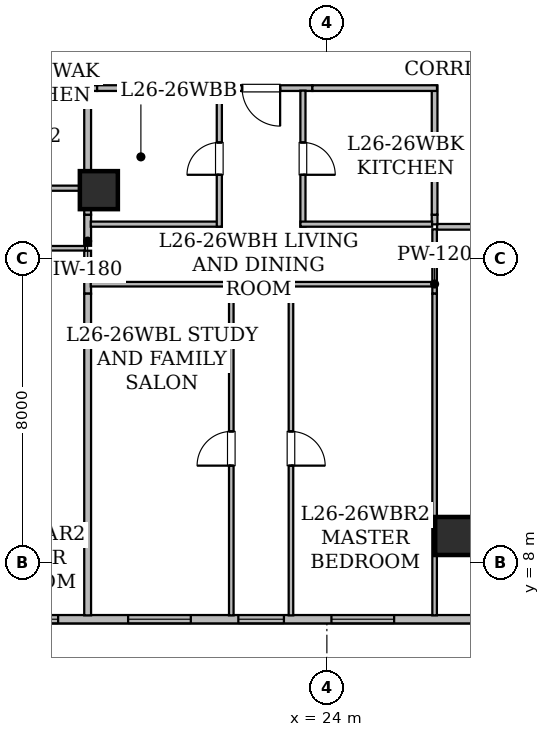
"""IFC4 building model, lengths in metres.
Left out: names, types, materials, properties, quantities, classifications, styles, units other than length and angle.
Written with IfcOpenShell. Run it as: python <this file> out.ifc"""

import sys

from ifc_helpers import new_model, si_unit, direction, frame, frame_2d, origin, origin_2d, place, context, subcontext, project, spatial, rectangle, hollow_rectangle, extrude, element, fill, save


model = new_model("IFC4")
c1 = context("Model", 3, precision=1e-05, world=origin(), true_north=direction((0.0, 1.0)))
c2 = subcontext(c1, "Body", "Model", "MODEL_VIEW")
j1 = project(units=[si_unit("LENGTHUNIT", "METRE"), si_unit("PLANEANGLEUNIT", "RADIAN")], contexts=[c1])
p1 = place(None, origin())
s1 = spatial("IfcSite", under=j1, at=p1, CompositionType="ELEMENT")
p2 = place(p1, origin())
s2 = spatial("IfcBuilding", under=s1, at=p2, CompositionType="ELEMENT")
p3 = place(p2, frame((0.0, 0.0, 105.55)))
s3 = spatial("IfcBuildingStorey", under=s2, at=p3, CompositionType="ELEMENT", Elevation=105.55)
for number, where, z_axis, x_axis in (
    (1, (27.35, 8.7, 0.0), (0.0, 0.0, 1.0), (1.0, 0.0, 0.0)),
    (2, (18.0, 17.8, 0.0), (0.0, 0.0, 1.0), (1.0, 0.0, 0.0)),
):
    element("IfcColumn", number, at=place(p3, frame(where, z_axis=z_axis, x_axis=x_axis)), inside=s3, PredefinedType="COLUMN", context=c2, shape_type="SweptSolid", body=[
        extrude(hollow_rectangle(XDim=1.0, YDim=1.0, WallThickness=0.05, at=origin_2d()), origin(), (0.0, 0.0, 1.0), 3.65),
    ])
p4 = place(p3, frame((52.283, 6.51, 0.0), z_axis=(0.0, 0.0, 1.0), x_axis=(-1.0, 0.0, 0.0)))
e3 = element("IfcWall", 3, at=p4, inside=s3, PredefinedType="STANDARD", context=c2, shape_type="SweptSolid", body=[
    extrude(rectangle(XDim=38.568, YDim=0.22, at=frame_2d((19.284, 0.0))), origin(), (0.0, 0.0, 1.0), 3.43),
])
p5 = place(p4, frame((21.108, 0.0, 0.85)))
e4 = element("IfcOpeningElement", 4, at=p5, cuts=e3, PredefinedType="OPENING", context=c2, shape_type="SweptSolid", body=[
    extrude(rectangle(XDim=1.65, YDim=1.55, at=frame_2d((0.825, 0.775))), frame((0.0, 0.12, 0.0), z_axis=(0.0, -1.0, 0.0), x_axis=(1.0, 0.0, 0.0)), (0.0, 0.0, 1.0), 0.24),
])
p6 = place(p4, frame((35.355, 0.0, 0.85)))
e5 = element("IfcOpeningElement", 5, at=p6, cuts=e3, PredefinedType="OPENING", context=c2, shape_type="SweptSolid", body=[
    extrude(rectangle(XDim=1.65, YDim=1.55, at=frame_2d((0.825, 0.775))), frame((0.0, 0.12, 0.0), z_axis=(0.0, -1.0, 0.0), x_axis=(1.0, 0.0, 0.0)), (0.0, 0.0, 1.0), 0.24),
])
p7 = place(p4, frame((29.413, 0.0, 0.8)))
e6 = element("IfcOpeningElement", 6, at=p7, cuts=e3, PredefinedType="OPENING", context=c2, shape_type="SweptSolid", body=[
    extrude(rectangle(XDim=1.2, YDim=1.5, at=frame_2d((0.6, 0.75))), frame((0.0, 0.12, 0.0), z_axis=(0.0, -1.0, 0.0), x_axis=(1.0, 0.0, 0.0)), (0.0, 0.0, 1.0), 0.24),
])
p8 = place(p4, frame((31.863, 0.0, 0.85)))
e7 = element("IfcOpeningElement", 7, at=p8, cuts=e3, PredefinedType="OPENING", context=c2, shape_type="SweptSolid", body=[
    extrude(rectangle(XDim=1.65, YDim=1.55, at=frame_2d((0.825, 0.775))), frame((0.0, 0.12, 0.0), z_axis=(0.0, -1.0, 0.0), x_axis=(1.0, 0.0, 0.0)), (0.0, 0.0, 1.0), 0.24),
])
p9 = place(p4, frame((26.513, 0.0, 0.85)))
e8 = element("IfcOpeningElement", 8, at=p9, cuts=e3, PredefinedType="OPENING", context=c2, shape_type="SweptSolid", body=[
    extrude(rectangle(XDim=1.65, YDim=1.55, at=frame_2d((0.825, 0.775))), frame((0.0, 0.12, 0.0), z_axis=(0.0, -1.0, 0.0), x_axis=(1.0, 0.0, 0.0)), (0.0, 0.0, 1.0), 0.24),
])
p10 = place(p4, frame((13.843, 0.0, 0.85)))
e9 = element("IfcOpeningElement", 9, at=p10, cuts=e3, PredefinedType="OPENING", context=c2, shape_type="SweptSolid", body=[
    extrude(rectangle(XDim=1.65, YDim=1.55, at=frame_2d((0.825, 0.775))), frame((0.0, 0.12, 0.0), z_axis=(0.0, -1.0, 0.0), x_axis=(1.0, 0.0, 0.0)), (0.0, 0.0, 1.0), 0.24),
])
p11 = place(p4, frame((1.479, 0.0, 0.85)))
e10 = element("IfcOpeningElement", 10, at=p11, cuts=e3, PredefinedType="OPENING", context=c2, shape_type="SweptSolid", body=[
    extrude(rectangle(XDim=1.65, YDim=1.55, at=frame_2d((0.825, 0.775))), frame((0.0, 0.12, 0.0), z_axis=(0.0, -1.0, 0.0), x_axis=(1.0, 0.0, 0.0)), (0.0, 0.0, 1.0), 0.24),
])
p12 = place(p3, frame((34.114, 16.835, 0.0), z_axis=(0.0, 0.0, 1.0), x_axis=(-1.0, 0.0, 0.0)))
e11 = element("IfcWall", 11, at=p12, inside=s3, PredefinedType="STANDARD", context=c2, shape_type="SweptSolid", body=[
    extrude(rectangle(XDim=7.214, YDim=0.15, at=frame_2d((3.607, 0.0))), origin(), (0.0, 0.0, 1.0), 2.647),
])
p13 = place(p12, frame((3.053, 0.0, 0.0)))
e12 = element("IfcOpeningElement", 12, at=p13, cuts=e11, PredefinedType="OPENING", context=c2, shape_type="SweptSolid", body=[
    extrude(rectangle(XDim=1.15, YDim=2.2, at=frame_2d((0.575, 1.1))), frame((0.0, 0.085, 0.0), z_axis=(0.0, -1.0, 0.0), x_axis=(1.0, 0.0, 0.0)), (0.0, 0.0, 1.0), 0.17),
])
p14 = place(p3, frame((17.954, 20.485, 0.0), z_axis=(0.0, 0.0, 1.0), x_axis=(-1.0, 0.0, 0.0)))
e13 = element("IfcWall", 13, at=p14, inside=s3, PredefinedType="STANDARD", context=c2, shape_type="SweptSolid", body=[
    extrude(rectangle(XDim=3.03, YDim=0.15, at=frame_2d((1.515, 0.0))), origin(), (0.0, 0.0, 1.0), 2.647),
])
p15 = place(p3, frame((26.835, 16.9, 0.0), z_axis=(0.0, 0.0, 1.0), x_axis=(0.0, 1.0, 0.0)))
e14 = element("IfcWall", 14, at=p15, inside=s3, PredefinedType="STANDARD", context=c2, shape_type="SweptSolid", body=[
    extrude(rectangle(XDim=0.254, YDim=0.15, at=frame_2d((0.127, 0.0))), origin(), (0.0, 0.0, 1.0), 3.43),
])
p16 = place(p3, frame((23.619, 20.485, 0.0), z_axis=(0.0, 0.0, 1.0), x_axis=(-1.0, 0.0, 0.0)))
e15 = element("IfcWall", 15, at=p16, inside=s3, PredefinedType="STANDARD", context=c2, shape_type="SweptSolid", body=[
    extrude(rectangle(XDim=2.698, YDim=0.15, at=frame_2d((1.349, 0.0))), origin(), (0.0, 0.0, 1.0), 3.43),
])
p17 = place(p16, frame((0.849, 0.0, 0.0)))
e16 = element("IfcOpeningElement", 16, at=p17, cuts=e15, PredefinedType="OPENING", context=c2, shape_type="SweptSolid", body=[
    extrude(rectangle(XDim=1.0, YDim=2.15, at=frame_2d((0.5, 1.075))), frame((0.0, 0.085, 0.0), z_axis=(0.0, -1.0, 0.0), x_axis=(1.0, 0.0, 0.0)), (0.0, 0.0, 1.0), 0.17),
])
p18 = place(p3, frame((20.921, 20.485, 0.0), z_axis=(0.0, 0.0, 1.0), x_axis=(-1.0, 0.0, 0.0)))
e17 = element("IfcWall", 17, at=p18, inside=s3, PredefinedType="STANDARD", context=c2, shape_type="SweptSolid", body=[
    extrude(rectangle(XDim=2.967, YDim=0.15, at=frame_2d((1.483, 0.0))), origin(), (0.0, 0.0, 1.0), 2.647),
])
p19 = place(p3, frame((26.835, 17.154, 0.0), z_axis=(0.0, 0.0, 1.0), x_axis=(0.0, 1.0, 0.0)))
e18 = element("IfcWall", 18, at=p19, inside=s3, PredefinedType="STANDARD", context=c2, shape_type="SweptSolid", body=[
    extrude(rectangle(XDim=3.396, YDim=0.15, at=frame_2d((1.698, 0.0))), origin(), (0.0, 0.0, 1.0), 2.647),
])
p20 = place(p3, frame((26.898, 20.485, 0.0), z_axis=(0.0, 0.0, 1.0), x_axis=(-1.0, 0.0, 0.0)))
e19 = element("IfcWall", 19, at=p20, inside=s3, PredefinedType="STANDARD", context=c2, shape_type="SweptSolid", body=[
    extrude(rectangle(XDim=3.279, YDim=0.15, at=frame_2d((1.64, 0.0))), origin(), (0.0, 0.0, 1.0), 3.43),
])
p21 = place(p3, frame((26.835, 15.076, 0.0), z_axis=(0.0, 0.0, 1.0), x_axis=(0.0, 1.0, 0.0)))
e20 = element("IfcWall", 20, at=p21, inside=s3, PredefinedType="PARTITIONING", context=c2, shape_type="SweptSolid", body=[
    extrude(rectangle(XDim=1.694, YDim=0.12, at=frame_2d((0.847, 0.0))), origin(), (0.0, 0.0, 1.0), 3.43),
])
p22 = place(p3, frame((26.835, 6.612, 0.0), z_axis=(0.0, 0.0, 1.0), x_axis=(0.0, 1.0, 0.0)))
e21 = element("IfcWall", 21, at=p22, inside=s3, PredefinedType="PARTITIONING", context=c2, shape_type="SweptSolid", body=[
    extrude(rectangle(XDim=8.464, YDim=0.12, at=frame_2d((4.232, 0.0))), origin(), (0.0, 0.0, 1.0), 2.876),
])
p23 = place(p3, frame((14.61, 17.851, 0.0), z_axis=(0.0, 0.0, 1.0), x_axis=(1.0, 0.0, 0.0)))
e22 = element("IfcWall", 22, at=p23, inside=s3, PredefinedType="PARTITIONING", context=c2, shape_type="SweptSolid", body=[
    extrude(rectangle(XDim=3.03, YDim=0.135, at=frame_2d((1.515, 0.0))), origin(), (0.0, 0.0, 1.0), 2.647),
])
p24 = place(p23, frame((1.09, 0.0, 0.0)))
e23 = element("IfcOpeningElement", 23, at=p24, cuts=e22, PredefinedType="OPENING", context=c2, shape_type="SweptSolid", body=[
    extrude(rectangle(XDim=0.85, YDim=2.1, at=frame_2d((0.425, 1.05))), frame((0.0, 0.077, 0.0), z_axis=(0.0, -1.0, 0.0), x_axis=(1.0, 0.0, 0.0)), (0.0, 0.0, 1.0), 0.155),
])
p25 = place(p3, frame((17.64, 16.271, 0.0), z_axis=(0.0, 0.0, 1.0), x_axis=(-1.0, 0.0, 0.0)))
e24 = element("IfcWall", 24, at=p25, inside=s3, PredefinedType="PARTITIONING", context=c2, shape_type="SweptSolid", body=[
    extrude(rectangle(XDim=3.345, YDim=0.12, at=frame_2d((1.672, 0.0))), origin(), (0.0, 0.0, 1.0), 2.647),
])
p26 = place(p3, frame((17.705, 17.154, 0.0), z_axis=(0.0, 0.0, 1.0), x_axis=(0.0, -1.0, 0.0)))
e25 = element("IfcWall", 25, at=p26, inside=s3, PredefinedType="STANDARD", context=c2, shape_type="SweptSolid", body=[
    extrude(rectangle(XDim=0.818, YDim=0.18, at=frame_2d((0.409, 0.0))), origin(), (0.0, 0.0, 1.0), 2.647),
])
p27 = place(p3, frame((17.705, 17.786, 0.0), z_axis=(0.0, 0.0, 1.0), x_axis=(0.0, -1.0, 0.0)))
e26 = element("IfcWall", 26, at=p27, inside=s3, PredefinedType="STANDARD", context=c2, shape_type="SweptSolid", body=[
    extrude(rectangle(XDim=0.632, YDim=0.18, at=frame_2d((0.316, 0.0))), origin(), (0.0, 0.0, 1.0), 2.647),
])
p28 = place(p3, frame((17.705, 20.418, 0.0), z_axis=(0.0, 0.0, 1.0), x_axis=(0.0, -1.0, 0.0)))
e27 = element("IfcWall", 27, at=p28, inside=s3, PredefinedType="STANDARD", context=c2, shape_type="SweptSolid", body=[
    extrude(rectangle(XDim=2.502, YDim=0.18, at=frame_2d((1.251, 0.0))), origin(), (0.0, 0.0, 1.0), 2.647),
])
p29 = place(p3, frame((17.705, 16.206, 0.0), z_axis=(0.0, 0.0, 1.0), x_axis=(0.0, -1.0, 0.0)))
e28 = element("IfcWall", 28, at=p29, inside=s3, PredefinedType="STANDARD", context=c2, shape_type="SweptSolid", body=[
    extrude(rectangle(XDim=1.13, YDim=0.18, at=frame_2d((0.565, 0.0))), origin(), (0.0, 0.0, 1.0), 2.647),
])
p30 = place(p3, frame((17.705, 15.076, 0.0), z_axis=(0.0, 0.0, 1.0), x_axis=(0.0, -1.0, 0.0)))
e29 = element("IfcWall", 29, at=p30, inside=s3, PredefinedType="STANDARD", context=c2, shape_type="SweptSolid", body=[
    extrude(rectangle(XDim=8.464, YDim=0.18, at=frame_2d((4.232, 0.0))), origin(), (0.0, 0.0, 1.0), 2.647),
])
p31 = place(p3, frame((17.787, 16.905, 0.0), z_axis=(0.0, 0.0, 1.0), x_axis=(1.0, 0.0, 0.0)))
e30 = element("IfcWall", 30, at=p31, inside=s3, PredefinedType="PARTITIONING", context=c2, shape_type="SweptSolid", body=[
    extrude(rectangle(XDim=3.448, YDim=0.135, at=frame_2d((1.724, 0.0))), origin(), (0.0, 0.0, 1.0), 2.647),
])
p32 = place(p3, frame((21.17, 16.84, 0.0), z_axis=(0.0, 0.0, 1.0), x_axis=(0.0, 1.0, 0.0)))
e31 = element("IfcWall", 31, at=p32, inside=s3, PredefinedType="PARTITIONING", context=c2, shape_type="SweptSolid", body=[
    extrude(rectangle(XDim=3.578, YDim=0.135, at=frame_2d((1.789, 0.0))), origin(), (0.0, 0.0, 1.0), 2.647),
])
p33 = place(p32, frame((1.364, 0.0, 0.0)))
e32 = element("IfcOpeningElement", 32, at=p33, cuts=e31, PredefinedType="OPENING", context=c2, shape_type="SweptSolid", body=[
    extrude(rectangle(XDim=0.85, YDim=2.1, at=frame_2d((0.425, 1.05))), frame((0.0, 0.077, 0.0), z_axis=(0.0, -1.0, 0.0), x_axis=(1.0, 0.0, 0.0)), (0.0, 0.0, 1.0), 0.155),
])
p34 = place(p3, frame((23.37, 20.418, 0.0), z_axis=(0.0, 0.0, 1.0), x_axis=(0.0, -1.0, 0.0)))
e33 = element("IfcWall", 33, at=p34, inside=s3, PredefinedType="PARTITIONING", context=c2, shape_type="SweptSolid", body=[
    extrude(rectangle(XDim=3.578, YDim=0.135, at=frame_2d((1.789, 0.0))), origin(), (0.0, 0.0, 1.0), 2.647),
])
p35 = place(p34, frame((1.364, 0.0, 0.0)))
e34 = element("IfcOpeningElement", 34, at=p35, cuts=e33, PredefinedType="OPENING", context=c2, shape_type="SweptSolid", body=[
    extrude(rectangle(XDim=0.85, YDim=2.1, at=frame_2d((0.425, 1.05))), frame((0.0, 0.077, 0.0), z_axis=(0.0, -1.0, 0.0), x_axis=(1.0, 0.0, 0.0)), (0.0, 0.0, 1.0), 0.155),
])
p36 = place(p3, frame((23.305, 16.905, 0.0), z_axis=(0.0, 0.0, 1.0), x_axis=(1.0, 0.0, 0.0)))
e35 = element("IfcWall", 35, at=p36, inside=s3, PredefinedType="PARTITIONING", context=c2, shape_type="SweptSolid", body=[
    extrude(rectangle(XDim=3.465, YDim=0.135, at=frame_2d((1.732, 0.0))), origin(), (0.0, 0.0, 1.0), 3.43),
])
p37 = place(p3, frame((21.485, 6.612, 0.0), z_axis=(0.0, 0.0, 1.0), x_axis=(0.0, 1.0, 0.0)))
e36 = element("IfcWall", 36, at=p37, inside=s3, PredefinedType="PARTITIONING", context=c2, shape_type="SweptSolid", body=[
    extrude(rectangle(XDim=8.778, YDim=0.12, at=frame_2d((4.389, 0.0))), origin(), (0.0, 0.0, 1.0), 2.876),
])
p38 = place(p37, frame((3.939, 0.0, 0.0)))
e37 = element("IfcOpeningElement", 37, at=p38, cuts=e36, PredefinedType="OPENING", context=c2, shape_type="SweptSolid", body=[
    extrude(rectangle(XDim=0.9, YDim=2.1, at=frame_2d((0.45, 1.05))), frame((0.0, 0.07, 0.0), z_axis=(0.0, -1.0, 0.0), x_axis=(1.0, 0.0, 0.0)), (0.0, 0.0, 1.0), 0.14),
])
p39 = place(p3, frame((21.55, 15.325, 0.0), z_axis=(0.0, 0.0, 1.0), x_axis=(-1.0, 0.0, 0.0)))
e38 = element("IfcWall", 38, at=p39, inside=s3, PredefinedType="PARTITIONING", context=c2, shape_type="SweptSolid", body=[
    extrude(rectangle(XDim=3.763, YDim=0.12, at=frame_2d((1.881, 0.0))), origin(), (0.0, 0.0, 1.0), 3.43),
])
p40 = place(p3, frame((26.781, 15.325, 0.0), z_axis=(0.0, 0.0, 1.0), x_axis=(-1.0, 0.0, 0.0)))
e39 = element("IfcWall", 39, at=p40, inside=s3, PredefinedType="PARTITIONING", context=c2, shape_type="SweptSolid", body=[
    extrude(rectangle(XDim=3.791, YDim=0.12, at=frame_2d((1.896, 0.0))), origin(), (0.0, 0.0, 1.0), 3.43),
])
p41 = place(p3, frame((23.055, 15.39, 0.0), z_axis=(0.0, 0.0, 1.0), x_axis=(0.0, -1.0, 0.0)))
e40 = element("IfcWall", 40, at=p41, inside=s3, PredefinedType="PARTITIONING", context=c2, shape_type="SweptSolid", body=[
    extrude(rectangle(XDim=8.778, YDim=0.12, at=frame_2d((4.389, 0.0))), origin(), (0.0, 0.0, 1.0), 2.876),
])
p42 = place(p41, frame((3.939, 0.0, 0.0)))
e41 = element("IfcOpeningElement", 41, at=p42, cuts=e40, PredefinedType="OPENING", context=c2, shape_type="SweptSolid", body=[
    extrude(rectangle(XDim=0.9, YDim=2.1, at=frame_2d((0.45, 1.05))), frame((0.0, 0.07, 0.0), z_axis=(0.0, -1.0, 0.0), x_axis=(1.0, 0.0, 0.0)), (0.0, 0.0, 1.0), 0.14),
])
p43 = place(p6, origin())
e42 = element("IfcWindow", 42, at=p43, inside=s3, PartitioningType="SINGLE_PANEL", PredefinedType="WINDOW", context=c2, shape_type="SweptSolid", body=[
    extrude(rectangle(XDim=1.65, YDim=1.55, at=frame_2d((0.825, 0.775))), frame((0.0, 0.03, 0.0), z_axis=(0.0, -1.0, 0.0), x_axis=(1.0, 0.0, 0.0)), (0.0, 0.0, 1.0), 0.06),
])
fill(e5, e42)
p44 = place(p7, origin())
e43 = element("IfcWindow", 43, at=p44, inside=s3, PartitioningType="SINGLE_PANEL", PredefinedType="WINDOW", context=c2, shape_type="SweptSolid", body=[
    extrude(rectangle(XDim=1.2, YDim=1.5, at=frame_2d((0.6, 0.75))), frame((0.0, 0.03, 0.0), z_axis=(0.0, -1.0, 0.0), x_axis=(1.0, 0.0, 0.0)), (0.0, 0.0, 1.0), 0.06),
])
fill(e6, e43)
p45 = place(p8, origin())
e44 = element("IfcWindow", 44, at=p45, inside=s3, PartitioningType="SINGLE_PANEL", PredefinedType="WINDOW", context=c2, shape_type="SweptSolid", body=[
    extrude(rectangle(XDim=1.65, YDim=1.55, at=frame_2d((0.825, 0.775))), frame((0.0, 0.03, 0.0), z_axis=(0.0, -1.0, 0.0), x_axis=(1.0, 0.0, 0.0)), (0.0, 0.0, 1.0), 0.06),
])
fill(e7, e44)
p46 = place(p9, origin())
e45 = element("IfcWindow", 45, at=p46, inside=s3, PartitioningType="SINGLE_PANEL", PredefinedType="WINDOW", context=c2, shape_type="SweptSolid", body=[
    extrude(rectangle(XDim=1.65, YDim=1.55, at=frame_2d((0.825, 0.775))), frame((0.0, 0.03, 0.0), z_axis=(0.0, -1.0, 0.0), x_axis=(1.0, 0.0, 0.0)), (0.0, 0.0, 1.0), 0.06),
])
fill(e8, e45)
p47 = place(p17, origin())
e46 = element("IfcDoor", 46, at=p47, inside=s3, OperationType="SINGLE_SWING_LEFT", PredefinedType="DOOR", context=c2, shape_type="SweptSolid", body=[
    extrude(rectangle(XDim=1.0, YDim=2.15, at=frame_2d((0.5, 1.075))), frame((0.0, 0.025, 0.0), z_axis=(0.0, -1.0, 0.0), x_axis=(1.0, 0.0, 0.0)), (0.0, 0.0, 1.0), 0.05),
])
fill(e16, e46)
p48 = place(p33, origin())
e47 = element("IfcDoor", 47, at=p48, inside=s3, OperationType="SINGLE_SWING_LEFT", PredefinedType="DOOR", context=c2, shape_type="SweptSolid", body=[
    extrude(rectangle(XDim=0.85, YDim=2.1, at=frame_2d((0.425, 1.05))), frame((0.0, 0.025, 0.0), z_axis=(0.0, -1.0, 0.0), x_axis=(1.0, 0.0, 0.0)), (0.0, 0.0, 1.0), 0.05),
])
fill(e32, e47)
p49 = place(p35, origin())
e48 = element("IfcDoor", 48, at=p49, inside=s3, OperationType="SINGLE_SWING_RIGHT", PredefinedType="DOOR", context=c2, shape_type="SweptSolid", body=[
    extrude(rectangle(XDim=0.85, YDim=2.1, at=frame_2d((0.425, 1.05))), frame((0.0, 0.025, 0.0), z_axis=(0.0, -1.0, 0.0), x_axis=(1.0, 0.0, 0.0)), (0.0, 0.0, 1.0), 0.05),
])
fill(e34, e48)
p50 = place(p38, origin())
e49 = element("IfcDoor", 49, at=p50, inside=s3, OperationType="SINGLE_SWING_LEFT", PredefinedType="DOOR", context=c2, shape_type="SweptSolid", body=[
    extrude(rectangle(XDim=0.9, YDim=2.1, at=frame_2d((0.45, 1.05))), frame((0.0, 0.025, 0.0), z_axis=(0.0, -1.0, 0.0), x_axis=(1.0, 0.0, 0.0)), (0.0, 0.0, 1.0), 0.05),
])
fill(e37, e49)
p51 = place(p42, origin())
e50 = element("IfcDoor", 50, at=p51, inside=s3, OperationType="SINGLE_SWING_RIGHT", PredefinedType="DOOR", context=c2, shape_type="SweptSolid", body=[
    extrude(rectangle(XDim=0.9, YDim=2.1, at=frame_2d((0.45, 1.05))), frame((0.0, 0.025, 0.0), z_axis=(0.0, -1.0, 0.0), x_axis=(1.0, 0.0, 0.0)), (0.0, 0.0, 1.0), 0.05),
])
fill(e41, e50)
save(model, sys.argv[1])
